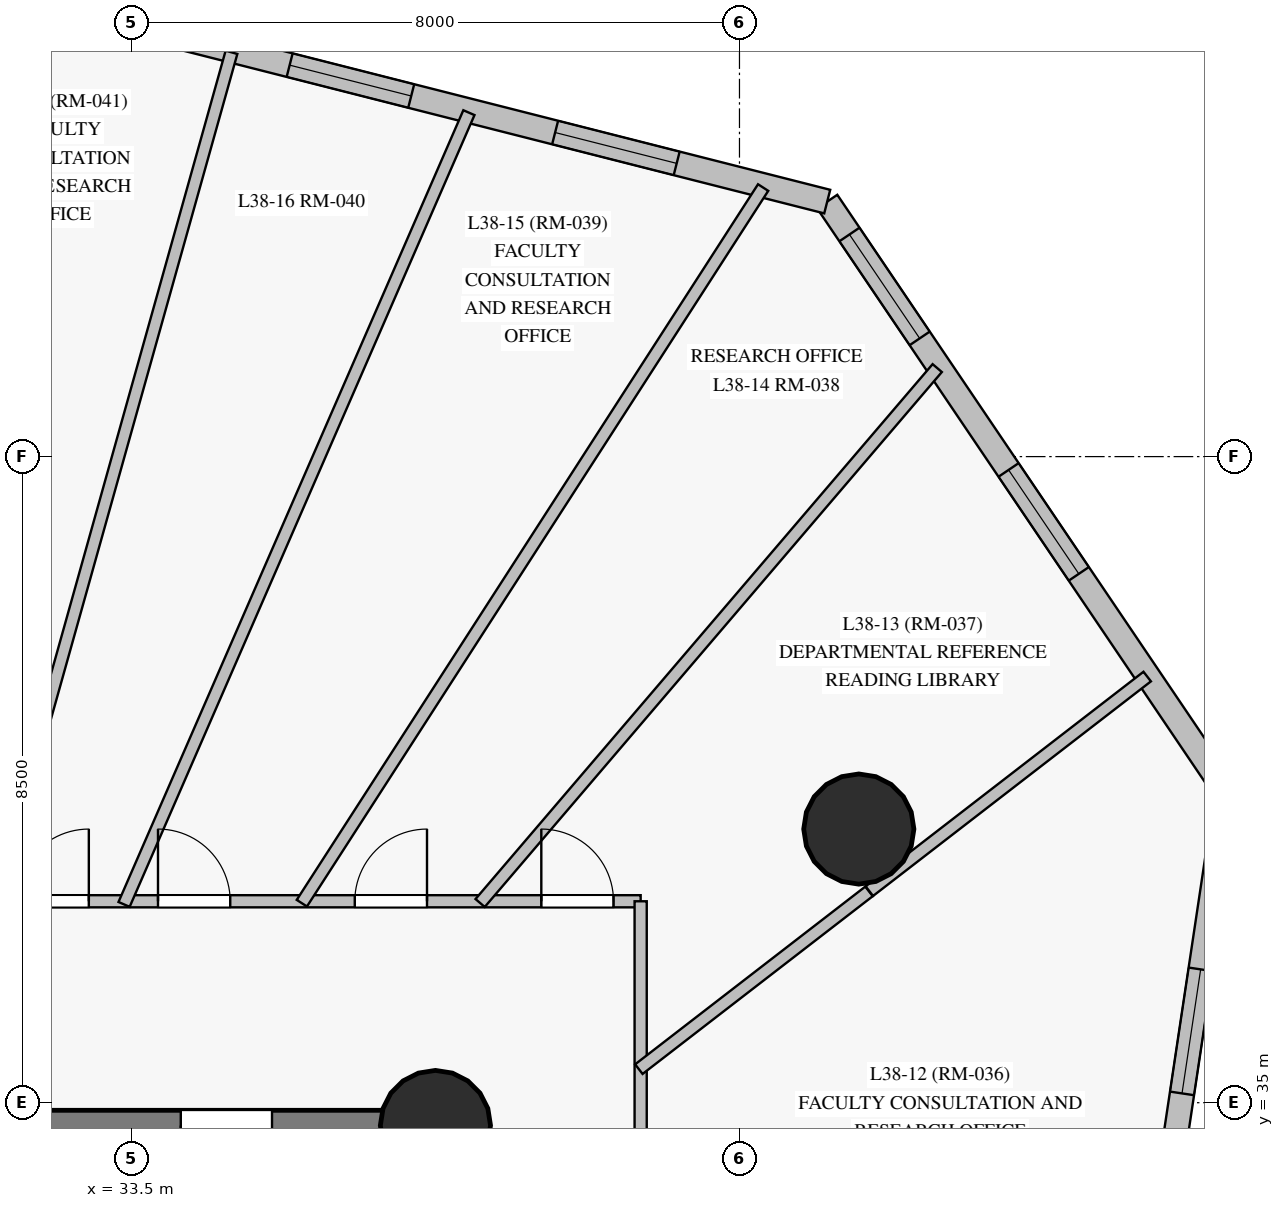
"""IFC4 building model, lengths in metres.
Left out: names, types, materials, properties, quantities, classifications, styles, units other than length and angle.
Written with IfcOpenShell. Run it as: python <this file> out.ifc"""

import sys

from ifc_helpers import new_model, si_unit, direction, frame, frame_2d, origin, origin_with_axes, origin_2d, place, context, subcontext, project, spatial, rectangle, circle, extrude, source, transform, mapped, element, fill, save


model = new_model("IFC4")
c1 = context("Model", 3, precision=1e-05, world=origin(), true_north=direction((0.0, 1.0)))
c2 = subcontext(c1, "Body", "Model", "MODEL_VIEW")
j1 = project(units=[si_unit("LENGTHUNIT", "METRE"), si_unit("PLANEANGLEUNIT", "RADIAN")], contexts=[c1])
p1 = place(None, origin())
s1 = spatial("IfcSite", under=j1, at=p1, CompositionType="ELEMENT")
p2 = place(p1, origin())
s2 = spatial("IfcBuilding", under=s1, at=p2, CompositionType="ELEMENT")
p3 = place(p2, frame((0.0, 0.0, 135.85)))
s3 = spatial("IfcBuildingStorey", under=s2, at=p3, CompositionType="ELEMENT", Elevation=135.85)
p4 = place(p3, frame((37.5, 18.3, 0.0), z_axis=(0.0, 0.0, 1.0), x_axis=(0.0, 1.0, 0.0)))
e1 = element("IfcWall", 1, at=p4, inside=s3, PredefinedType="SHEAR", context=c2, shape_type="SweptSolid", body=[
    extrude(rectangle(XDim=16.4, YDim=0.4, at=frame_2d((8.2, 0.0))), origin(), (0.0, 0.0, 1.0), 2.825),
])
p5 = place(p4, frame((14.15, 0.0, 0.0)))
e2 = element("IfcOpeningElement", 2, at=p5, cuts=e1, PredefinedType="OPENING", context=c2, shape_type="SweptSolid", body=[
    extrude(rectangle(XDim=1.2, YDim=2.15, at=frame_2d((0.6, 1.075))), frame((0.0, 0.21, 0.0), z_axis=(0.0, -1.0, 0.0), x_axis=(1.0, 0.0, 0.0)), (0.0, 0.0, 1.0), 0.42),
])
p6 = place(p3, frame((37.5, 34.7, 0.0), z_axis=(0.0, 0.0, 1.0), x_axis=(-1.0, 0.0, 0.0)))
e3 = element("IfcWall", 3, at=p6, inside=s3, PredefinedType="SHEAR", context=c2, shape_type="SweptSolid", body=[
    extrude(rectangle(XDim=10.95, YDim=0.4, at=frame_2d((5.475, 0.0))), origin(), (0.0, 0.0, 1.0), 2.825),
])
p7 = place(p6, frame((2.15, 0.0, 0.0)))
e4 = element("IfcOpeningElement", 4, at=p7, cuts=e3, PredefinedType="OPENING", context=c2, shape_type="SweptSolid", body=[
    extrude(rectangle(XDim=1.2, YDim=2.15, at=frame_2d((0.6, 1.075))), frame((0.0, 0.21, 0.0), z_axis=(0.0, -1.0, 0.0), x_axis=(1.0, 0.0, 0.0)), (0.0, 0.0, 1.0), 0.42),
])
p8 = place(p6, frame((6.35, 0.0, 0.0)))
e5 = element("IfcOpeningElement", 5, at=p8, cuts=e3, PredefinedType="OPENING", context=c2, shape_type="SweptSolid", body=[
    extrude(rectangle(XDim=1.1, YDim=2.15, at=frame_2d((0.55, 1.075))), frame((0.0, 0.21, 0.0), z_axis=(0.0, -1.0, 0.0), x_axis=(1.0, 0.0, 0.0)), (0.0, 0.0, 1.0), 0.42),
])
m1 = source(origin_with_axes(), c2, "Body", "SweptSolid", [
    extrude(circle(Radius=0.725, at=origin_2d()), origin(), (0.0, 0.0, 1.0), 3.05),
])
for number, where, z_axis, x_axis in (
    (6, (37.5, 34.7, 0.0), (0.0, 0.0, 1.0), (1.0, 0.0, 0.0)),
    (7, (43.07, 38.6, 0.0), (0.0, 0.0, 1.0), (1.0, 0.0, 0.0)),
):
    element("IfcColumn", number, at=place(p3, frame(where, z_axis=z_axis, x_axis=x_axis)), inside=s3, PredefinedType="COLUMN", context=c2, shape_type="MappedRepresentation", body=[
        mapped(m1, transform((0.0, 0.0, 0.0), scale=1.0)),
    ])
p9 = place(p3, frame((45.834, 25.221, 0.0), z_axis=(0.0, 0.0, 1.0), x_axis=(0.148592768658, 0.988898472596, 0.0)))
e8 = element("IfcWall", 8, at=p9, inside=s3, PredefinedType="SOLIDWALL", context=c2, shape_type="SweptSolid", body=[
    extrude(rectangle(XDim=14.005, YDim=0.32, at=frame_2d((7.002, 0.0))), origin(), (0.0, 0.0, 1.0), 2.825),
])
p10 = place(p9, frame((1.312, 0.0, 0.85)))
e9 = element("IfcOpeningElement", 9, at=p10, cuts=e8, PredefinedType="OPENING", context=c2, shape_type="SweptSolid", body=[
    extrude(rectangle(XDim=1.65, YDim=1.65, at=frame_2d((0.825, 0.825))), frame((0.0, 0.17, 0.0), z_axis=(0.0, -1.0, 0.0), x_axis=(1.0, 0.0, 0.0)), (0.0, 0.0, 1.0), 0.34),
])
p11 = place(p9, frame((4.827, 0.0, 0.85)))
e10 = element("IfcOpeningElement", 10, at=p11, cuts=e8, PredefinedType="OPENING", context=c2, shape_type="SweptSolid", body=[
    extrude(rectangle(XDim=1.65, YDim=1.65, at=frame_2d((0.825, 0.825))), frame((0.0, 0.17, 0.0), z_axis=(0.0, -1.0, 0.0), x_axis=(1.0, 0.0, 0.0)), (0.0, 0.0, 1.0), 0.34),
])
p12 = place(p9, frame((10.012, 0.0, 0.85)))
e11 = element("IfcOpeningElement", 11, at=p12, cuts=e8, PredefinedType="OPENING", context=c2, shape_type="SweptSolid", body=[
    extrude(rectangle(XDim=1.65, YDim=1.65, at=frame_2d((0.825, 0.825))), frame((0.0, 0.17, 0.0), z_axis=(0.0, -1.0, 0.0), x_axis=(1.0, 0.0, 0.0)), (0.0, 0.0, 1.0), 0.34),
])
p13 = place(p3, frame((47.916, 39.071, 0.0), z_axis=(0.0, 0.0, 1.0), x_axis=(-0.559977947863, 0.828507512282, 0.0)))
e12 = element("IfcWall", 12, at=p13, inside=s3, PredefinedType="SOLIDWALL", context=c2, shape_type="SweptSolid", body=[
    extrude(rectangle(XDim=9.396, YDim=0.32, at=frame_2d((4.698, 0.0))), origin(), (0.0, 0.0, 1.0), 2.825),
])
p14 = place(p13, frame((3.484, 0.0, 0.85)))
e13 = element("IfcOpeningElement", 13, at=p14, cuts=e12, PredefinedType="OPENING", context=c2, shape_type="SweptSolid", body=[
    extrude(rectangle(XDim=1.65, YDim=1.65, at=frame_2d((0.825, 0.825))), frame((0.0, 0.17, 0.0), z_axis=(0.0, -1.0, 0.0), x_axis=(1.0, 0.0, 0.0)), (0.0, 0.0, 1.0), 0.34),
])
p15 = place(p13, frame((7.223, 0.0, 0.85)))
e14 = element("IfcOpeningElement", 14, at=p15, cuts=e12, PredefinedType="OPENING", context=c2, shape_type="SweptSolid", body=[
    extrude(rectangle(XDim=1.65, YDim=1.65, at=frame_2d((0.825, 0.825))), frame((0.0, 0.17, 0.0), z_axis=(0.0, -1.0, 0.0), x_axis=(1.0, 0.0, 0.0)), (0.0, 0.0, 1.0), 0.34),
])
p16 = place(p3, frame((42.654, 46.855, 0.0), z_axis=(0.0, 0.0, 1.0), x_axis=(-0.969260142648, 0.246038159386, 0.0)))
e15 = element("IfcWall", 15, at=p16, inside=s3, PredefinedType="SOLIDWALL", context=c2, shape_type="SweptSolid", body=[
    extrude(rectangle(XDim=11.738, YDim=0.32, at=frame_2d((5.869, 0.0))), origin(), (0.0, 0.0, 1.0), 2.825),
])
p17 = place(p16, frame((2.043, 0.0, 0.85)))
e16 = element("IfcOpeningElement", 16, at=p17, cuts=e15, PredefinedType="OPENING", context=c2, shape_type="SweptSolid", body=[
    extrude(rectangle(XDim=1.65, YDim=1.65, at=frame_2d((0.825, 0.825))), frame((0.0, 0.17, 0.0), z_axis=(0.0, -1.0, 0.0), x_axis=(1.0, 0.0, 0.0)), (0.0, 0.0, 1.0), 0.34),
])
p18 = place(p16, frame((5.646, 0.0, 0.85)))
e17 = element("IfcOpeningElement", 17, at=p18, cuts=e15, PredefinedType="OPENING", context=c2, shape_type="SweptSolid", body=[
    extrude(rectangle(XDim=1.65, YDim=1.65, at=frame_2d((0.825, 0.825))), frame((0.0, 0.17, 0.0), z_axis=(0.0, -1.0, 0.0), x_axis=(1.0, 0.0, 0.0)), (0.0, 0.0, 1.0), 0.34),
])
p19 = place(p16, frame((9.054, 0.0, 0.85)))
e18 = element("IfcOpeningElement", 18, at=p19, cuts=e15, PredefinedType="OPENING", context=c2, shape_type="SweptSolid", body=[
    extrude(rectangle(XDim=1.65, YDim=1.65, at=frame_2d((0.825, 0.825))), frame((0.0, 0.17, 0.0), z_axis=(0.0, -1.0, 0.0), x_axis=(1.0, 0.0, 0.0)), (0.0, 0.0, 1.0), 0.34),
])
p20 = place(p3, frame((16.7, 37.65, 0.0), z_axis=(0.0, 0.0, 1.0), x_axis=(1.0, 0.0, 0.0)))
e19 = element("IfcWall", 19, at=p20, inside=s3, PredefinedType="PARTITIONING", context=c2, shape_type="SweptSolid", body=[
    extrude(rectangle(XDim=23.5, YDim=0.16, at=frame_2d((11.75, 0.0))), origin(), (0.0, 0.0, 1.0), 2.325),
])
p21 = place(p20, frame((22.193, 0.0, 0.0)))
e20 = element("IfcOpeningElement", 20, at=p21, cuts=e19, PredefinedType="OPENING", context=c2, shape_type="SweptSolid", body=[
    extrude(rectangle(XDim=0.95, YDim=2.15, at=frame_2d((0.475, 1.075))), frame((0.0, 0.09, 0.0), z_axis=(0.0, -1.0, 0.0), x_axis=(1.0, 0.0, 0.0)), (0.0, 0.0, 1.0), 0.18),
])
p22 = place(p20, frame((19.739, 0.0, 0.0)))
e21 = element("IfcOpeningElement", 21, at=p22, cuts=e19, PredefinedType="OPENING", context=c2, shape_type="SweptSolid", body=[
    extrude(rectangle(XDim=0.95, YDim=2.15, at=frame_2d((0.475, 1.075))), frame((0.0, 0.09, 0.0), z_axis=(0.0, -1.0, 0.0), x_axis=(1.0, 0.0, 0.0)), (0.0, 0.0, 1.0), 0.18),
])
p23 = place(p20, frame((17.15, 0.0, 0.0)))
e22 = element("IfcOpeningElement", 22, at=p23, cuts=e19, PredefinedType="OPENING", context=c2, shape_type="SweptSolid", body=[
    extrude(rectangle(XDim=0.95, YDim=2.15, at=frame_2d((0.475, 1.075))), frame((0.0, 0.09, 0.0), z_axis=(0.0, -1.0, 0.0), x_axis=(1.0, 0.0, 0.0)), (0.0, 0.0, 1.0), 0.18),
])
p24 = place(p20, frame((15.29, 0.0, 0.0)))
e23 = element("IfcOpeningElement", 23, at=p24, cuts=e19, PredefinedType="OPENING", context=c2, shape_type="SweptSolid", body=[
    extrude(rectangle(XDim=0.95, YDim=2.15, at=frame_2d((0.475, 1.075))), frame((0.0, 0.09, 0.0), z_axis=(0.0, -1.0, 0.0), x_axis=(1.0, 0.0, 0.0)), (0.0, 0.0, 1.0), 0.18),
])
p25 = place(p20, frame((13.507, 0.0, 0.0)))
e24 = element("IfcOpeningElement", 24, at=p25, cuts=e19, PredefinedType="OPENING", context=c2, shape_type="SweptSolid", body=[
    extrude(rectangle(XDim=0.95, YDim=2.15, at=frame_2d((0.475, 1.075))), frame((0.0, 0.09, 0.0), z_axis=(0.0, -1.0, 0.0), x_axis=(1.0, 0.0, 0.0)), (0.0, 0.0, 1.0), 0.18),
])
p26 = place(p20, frame((11.415, 0.0, 0.0)))
e25 = element("IfcOpeningElement", 25, at=p26, cuts=e19, PredefinedType="OPENING", context=c2, shape_type="SweptSolid", body=[
    extrude(rectangle(XDim=0.95, YDim=2.15, at=frame_2d((0.475, 1.075))), frame((0.0, 0.09, 0.0), z_axis=(0.0, -1.0, 0.0), x_axis=(1.0, 0.0, 0.0)), (0.0, 0.0, 1.0), 0.18),
])
p27 = place(p20, frame((9.772, 0.0, 0.0)))
e26 = element("IfcOpeningElement", 26, at=p27, cuts=e19, PredefinedType="OPENING", context=c2, shape_type="SweptSolid", body=[
    extrude(rectangle(XDim=0.95, YDim=2.15, at=frame_2d((0.475, 1.075))), frame((0.0, 0.09, 0.0), z_axis=(0.0, -1.0, 0.0), x_axis=(1.0, 0.0, 0.0)), (0.0, 0.0, 1.0), 0.18),
])
p28 = place(p20, frame((7.75, 0.0, 0.0)))
e27 = element("IfcOpeningElement", 27, at=p28, cuts=e19, PredefinedType="OPENING", context=c2, shape_type="SweptSolid", body=[
    extrude(rectangle(XDim=0.95, YDim=2.15, at=frame_2d((0.475, 1.075))), frame((0.0, 0.09, 0.0), z_axis=(0.0, -1.0, 0.0), x_axis=(1.0, 0.0, 0.0)), (0.0, 0.0, 1.0), 0.18),
])
p29 = place(p20, frame((3.021, 0.0, 0.0)))
e28 = element("IfcOpeningElement", 28, at=p29, cuts=e19, PredefinedType="OPENING", context=c2, shape_type="SweptSolid", body=[
    extrude(rectangle(XDim=0.95, YDim=2.15, at=frame_2d((0.475, 1.075))), frame((0.0, 0.09, 0.0), z_axis=(0.0, -1.0, 0.0), x_axis=(1.0, 0.0, 0.0)), (0.0, 0.0, 1.0), 0.18),
])
p30 = place(p3, frame((40.2, 37.65, 0.0), z_axis=(0.0, 0.0, 1.0), x_axis=(0.0, -1.0, 0.0)))
e29 = element("IfcWall", 29, at=p30, inside=s3, PredefinedType="PARTITIONING", context=c2, shape_type="SweptSolid", body=[
    extrude(rectangle(XDim=22.3, YDim=0.16, at=frame_2d((11.15, 0.0))), origin(), (0.0, 0.0, 1.0), 2.325),
])
p31 = place(p30, frame((14.02, 0.0, 0.0)))
e30 = element("IfcOpeningElement", 30, at=p31, cuts=e29, PredefinedType="OPENING", context=c2, shape_type="SweptSolid", body=[
    extrude(rectangle(XDim=0.95, YDim=2.15, at=frame_2d((0.475, 1.075))), frame((0.0, 0.09, 0.0), z_axis=(0.0, -1.0, 0.0), x_axis=(1.0, 0.0, 0.0)), (0.0, 0.0, 1.0), 0.18),
])
p32 = place(p30, frame((10.675, 0.0, 0.0)))
e31 = element("IfcOpeningElement", 31, at=p32, cuts=e29, PredefinedType="OPENING", context=c2, shape_type="SweptSolid", body=[
    extrude(rectangle(XDim=0.95, YDim=2.15, at=frame_2d((0.475, 1.075))), frame((0.0, 0.09, 0.0), z_axis=(0.0, -1.0, 0.0), x_axis=(1.0, 0.0, 0.0)), (0.0, 0.0, 1.0), 0.18),
])
p33 = place(p30, frame((5.1, 0.0, 0.0)))
e32 = element("IfcOpeningElement", 32, at=p33, cuts=e29, PredefinedType="OPENING", context=c2, shape_type="SweptSolid", body=[
    extrude(rectangle(XDim=0.95, YDim=2.15, at=frame_2d((0.475, 1.075))), frame((0.0, 0.09, 0.0), z_axis=(0.0, -1.0, 0.0), x_axis=(1.0, 0.0, 0.0)), (0.0, 0.0, 1.0), 0.18),
])
p34 = place(p3, frame((31.679, 37.621, 0.0), z_axis=(0.0, 0.0, 1.0), x_axis=(0.269840173921, 0.962905125409, 0.0)))
e33 = element("IfcWall", 33, at=p34, inside=s3, PredefinedType="PARTITIONING", context=c2, shape_type="SweptSolid", body=[
    extrude(rectangle(XDim=11.629, YDim=0.16, at=frame_2d((5.814, 0.0))), origin(), (0.0, 0.0, 1.0), 2.825),
])
p35 = place(p3, frame((33.404, 37.609, 0.0), z_axis=(0.0, 0.0, 1.0), x_axis=(0.399304349974, 0.916818431366, 0.0)))
e34 = element("IfcWall", 34, at=p35, inside=s3, PredefinedType="PARTITIONING", context=c2, shape_type="SweptSolid", body=[
    extrude(rectangle(XDim=11.361, YDim=0.16, at=frame_2d((5.681, 0.0))), origin(), (0.0, 0.0, 1.0), 2.825),
])
p36 = place(p3, frame((35.742, 37.625, 0.0), z_axis=(0.0, 0.0, 1.0), x_axis=(0.541798178904, 0.840508615861, 0.0)))
e35 = element("IfcWall", 35, at=p36, inside=s3, PredefinedType="PARTITIONING", context=c2, shape_type="SweptSolid", body=[
    extrude(rectangle(XDim=11.201, YDim=0.16, at=frame_2d((5.601, 0.0))), origin(), (0.0, 0.0, 1.0), 2.825),
])
p37 = place(p3, frame((38.088, 37.627, 0.0), z_axis=(0.0, 0.0, 1.0), x_axis=(0.649663413135, 0.760221973922, 0.0)))
e36 = element("IfcWall", 36, at=p37, inside=s3, PredefinedType="PARTITIONING", context=c2, shape_type="SweptSolid", body=[
    extrude(rectangle(XDim=9.257, YDim=0.16, at=frame_2d((4.628, 0.0))), origin(), (0.0, 0.0, 1.0), 2.825),
])
p38 = place(p3, frame((40.176, 35.441, 0.0), z_axis=(0.0, 0.0, 1.0), x_axis=(0.791467391046, 0.611211394617, 0.0)))
e37 = element("IfcWall", 37, at=p38, inside=s3, PredefinedType="PARTITIONING", context=c2, shape_type="SweptSolid", body=[
    extrude(rectangle(XDim=3.826, YDim=0.16, at=frame_2d((1.913, 0.0))), origin(), (0.0, 0.0, 1.0), 2.825),
])
p39 = place(p3, frame((43.208, 37.783, 0.0), z_axis=(0.0, 0.0, 1.0), x_axis=(0.791484900465, 0.611188720721, 0.0)))
e38 = element("IfcWall", 38, at=p39, inside=s3, PredefinedType="PARTITIONING", context=c2, shape_type="SweptSolid", body=[
    extrude(rectangle(XDim=4.619, YDim=0.16, at=frame_2d((2.31, 0.0))), origin(), (0.0, 0.0, 1.0), 2.825),
])
m2 = source(origin_with_axes(), c2, "Body", "SweptSolid", [
    extrude(rectangle(XDim=1.65, YDim=1.65, at=frame_2d((0.825, 0.825))), frame((0.0, 0.03, 0.0), z_axis=(0.0, -1.0, 0.0), x_axis=(1.0, 0.0, 0.0)), (0.0, 0.0, 1.0), 0.06),
])
p40 = place(p12, origin())
e39 = element("IfcWindow", 39, at=p40, inside=s3, PartitioningType="SINGLE_PANEL", PredefinedType="WINDOW", context=c2, shape_type="MappedRepresentation", body=[
    mapped(m2, transform((0.0, 0.0, 0.0), scale=1.0)),
])
fill(e11, e39)
p41 = place(p14, origin())
e40 = element("IfcWindow", 40, at=p41, inside=s3, PartitioningType="SINGLE_PANEL", PredefinedType="WINDOW", context=c2, shape_type="MappedRepresentation", body=[
    mapped(m2, transform((0.0, 0.0, 0.0), scale=1.0)),
])
fill(e13, e40)
p42 = place(p15, origin())
e41 = element("IfcWindow", 41, at=p42, inside=s3, PartitioningType="SINGLE_PANEL", PredefinedType="WINDOW", context=c2, shape_type="MappedRepresentation", body=[
    mapped(m2, transform((0.0, 0.0, 0.0), scale=1.0)),
])
fill(e14, e41)
p43 = place(p17, origin())
e42 = element("IfcWindow", 42, at=p43, inside=s3, PartitioningType="SINGLE_PANEL", PredefinedType="WINDOW", context=c2, shape_type="MappedRepresentation", body=[
    mapped(m2, transform((0.0, 0.0, 0.0), scale=1.0)),
])
fill(e16, e42)
p44 = place(p18, origin())
e43 = element("IfcWindow", 43, at=p44, inside=s3, PartitioningType="SINGLE_PANEL", PredefinedType="WINDOW", context=c2, shape_type="MappedRepresentation", body=[
    mapped(m2, transform((0.0, 0.0, 0.0), scale=1.0)),
])
fill(e17, e43)
m3 = source(origin_with_axes(), c2, "Body", "SweptSolid", [
    extrude(rectangle(XDim=1.2, YDim=2.15, at=frame_2d((0.6, 1.075))), frame((0.0, 0.025, 0.0), z_axis=(0.0, -1.0, 0.0), x_axis=(1.0, 0.0, 0.0)), (0.0, 0.0, 1.0), 0.05),
])
p45 = place(p7, origin())
e44 = element("IfcDoor", 44, at=p45, inside=s3, OperationType="SINGLE_SWING_RIGHT", PredefinedType="DOOR", context=c2, shape_type="MappedRepresentation", body=[
    mapped(m3, transform((0.0, 0.0, 0.0), scale=1.0)),
])
fill(e4, e44)
m4 = source(origin_with_axes(), c2, "Body", "SweptSolid", [
    extrude(rectangle(XDim=0.95, YDim=2.15, at=frame_2d((0.475, 1.075))), frame((0.0, 0.025, 0.0), z_axis=(0.0, -1.0, 0.0), x_axis=(1.0, 0.0, 0.0)), (0.0, 0.0, 1.0), 0.05),
])
p46 = place(p21, origin())
e45 = element("IfcDoor", 45, at=p46, inside=s3, OperationType="SINGLE_SWING_LEFT", PredefinedType="DOOR", context=c2, shape_type="MappedRepresentation", body=[
    mapped(m4, transform((0.0, 0.0, 0.0), scale=1.0)),
])
fill(e20, e45)
p47 = place(p22, origin())
e46 = element("IfcDoor", 46, at=p47, inside=s3, OperationType="SINGLE_SWING_RIGHT", PredefinedType="DOOR", context=c2, shape_type="MappedRepresentation", body=[
    mapped(m4, transform((0.0, 0.0, 0.0), scale=1.0)),
])
fill(e21, e46)
p48 = place(p23, origin())
e47 = element("IfcDoor", 47, at=p48, inside=s3, OperationType="SINGLE_SWING_LEFT", PredefinedType="DOOR", context=c2, shape_type="MappedRepresentation", body=[
    mapped(m4, transform((0.0, 0.0, 0.0), scale=1.0)),
])
fill(e22, e47)
p49 = place(p24, origin())
e48 = element("IfcDoor", 48, at=p49, inside=s3, OperationType="SINGLE_SWING_RIGHT", PredefinedType="DOOR", context=c2, shape_type="MappedRepresentation", body=[
    mapped(m4, transform((0.0, 0.0, 0.0), scale=1.0)),
])
fill(e23, e48)
save(model, sys.argv[1])
